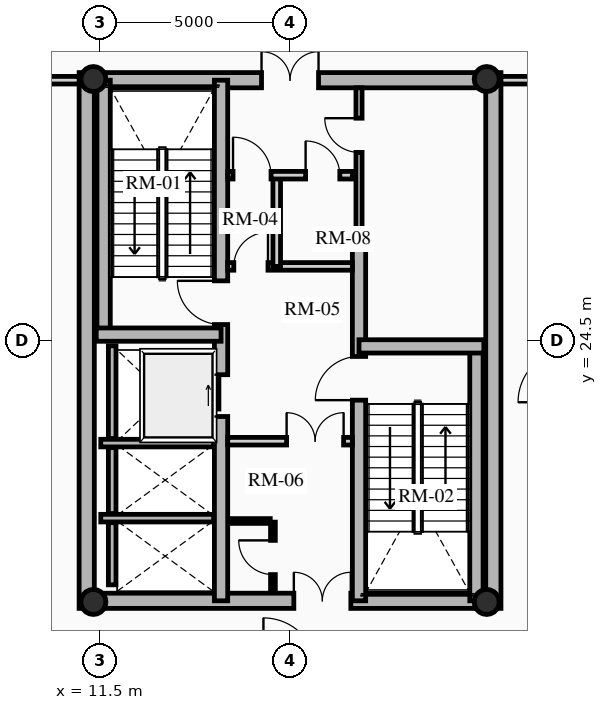
"""IFC4 building model, lengths in metres.
Left out: names, types, materials, properties, quantities, classifications, styles, units other than length and angle.
Written with IfcOpenShell. Run it as: python <this file> out.ifc"""

import sys

from ifc_helpers import new_model, si_unit, direction, frame, frame_2d, origin, origin_2d, place, context, subcontext, project, spatial, rectangle, hollow_circle, extrude, source, transform, mapped, element, fill, save


model = new_model("IFC4")
c1 = context("Model", 3, precision=1e-05, world=origin(), true_north=direction((0.0, 1.0)))
c2 = subcontext(c1, "Body", "Model", "MODEL_VIEW")
j1 = project(units=[si_unit("LENGTHUNIT", "METRE"), si_unit("PLANEANGLEUNIT", "RADIAN")], contexts=[c1])
p1 = place(None, origin())
s1 = spatial("IfcSite", under=j1, at=p1, CompositionType="ELEMENT")
p2 = place(p1, origin())
s2 = spatial("IfcBuilding", under=s1, at=p2, CompositionType="ELEMENT")
p3 = place(p2, frame((0.0, 0.0, 235.65)))
s3 = spatial("IfcBuildingStorey", under=s2, at=p3, CompositionType="ELEMENT", Elevation=235.65)
for number, where, z_axis, x_axis in (
    (1, (11.15, 17.45, 0.0), (0.0, 0.0, 1.0), (0.0, 1.0, 0.0)),
    (2, (21.85, 17.45, 0.0), (0.0, 0.0, 1.0), (0.0, 1.0, 0.0)),
):
    element("IfcWall", number, at=place(p3, frame(where, z_axis=z_axis, x_axis=x_axis)), inside=s3, PredefinedType="SHEAR", context=c2, shape_type="SweptSolid", body=[
        extrude(rectangle(XDim=14.1, YDim=0.4, at=frame_2d((7.05, 0.0))), origin(), (0.0, 0.0, 1.0), 4.68),
    ])
p4 = place(p3, frame((11.15, 17.65, 0.0), z_axis=(0.0, 0.0, 1.0), x_axis=(1.0, 0.0, 0.0)))
e3 = element("IfcWall", 3, at=p4, inside=s3, PredefinedType="SHEAR", context=c2, shape_type="SweptSolid", body=[
    extrude(rectangle(XDim=10.7, YDim=0.4, at=frame_2d((5.35, 0.0))), origin(), (0.0, 0.0, 1.0), 4.68),
])
m1 = source(origin(), c2, "Body", "SweptSolid", [
    extrude(rectangle(XDim=1.5, YDim=2.02, at=frame_2d((0.75, 1.01))), frame((0.0, 0.21, 0.0), z_axis=(0.0, -1.0, 0.0), x_axis=(1.0, 0.0, 0.0)), (0.0, 0.0, 1.0), 0.42),
])
p5 = place(p4, frame((5.45, 0.0, 0.0)))
e4 = element("IfcOpeningElement", 4, at=p5, cuts=e3, PredefinedType="OPENING", context=c2, shape_type="MappedRepresentation", body=[
    mapped(m1, transform((0.0, 0.0, 0.0), x_axis=(1.0, 0.0, 0.0), y_axis=(0.0, 1.0, 0.0), z_axis=(0.0, 0.0, 1.0), scale=1.0)),
])
p6 = place(p3, frame((11.15, 31.35, 0.0), z_axis=(0.0, 0.0, 1.0), x_axis=(1.0, 0.0, 0.0)))
e5 = element("IfcWall", 5, at=p6, inside=s3, PredefinedType="SHEAR", context=c2, shape_type="SweptSolid", body=[
    extrude(rectangle(XDim=10.7, YDim=0.4, at=frame_2d((5.35, 0.0))), origin(), (0.0, 0.0, 1.0), 4.68),
])
p7 = place(p6, frame((4.6, 0.0, 0.0)))
e6 = element("IfcOpeningElement", 6, at=p7, cuts=e5, PredefinedType="OPENING", context=c2, shape_type="MappedRepresentation", body=[
    mapped(m1, transform((0.0, 0.0, 0.0), x_axis=(1.0, 0.0, 0.0), y_axis=(0.0, 1.0, 0.0), z_axis=(0.0, 0.0, 1.0), scale=1.0)),
])
p8 = place(p3, frame((14.685, 17.65, 0.0), z_axis=(0.0, 0.0, 1.0), x_axis=(0.0, 1.0, 0.0)))
e7 = element("IfcWall", 7, at=p8, inside=s3, PredefinedType="SHEAR", context=c2, shape_type="SweptSolid", body=[
    extrude(rectangle(XDim=13.7, YDim=0.35, at=frame_2d((6.85, 0.0))), origin(), (0.0, 0.0, 1.0), 4.68),
])
m2 = source(origin(), c2, "Body", "SweptSolid", [
    extrude(rectangle(XDim=1.1, YDim=2.015, at=frame_2d((0.55, 1.007))), frame((0.0, 0.185, 0.0), z_axis=(0.0, -1.0, 0.0), x_axis=(1.0, 0.0, 0.0)), (0.0, 0.0, 1.0), 0.37),
])
p9 = place(p8, frame((4.85, 0.0, 0.0)))
e8 = element("IfcOpeningElement", 8, at=p9, cuts=e7, PredefinedType="OPENING", context=c2, shape_type="MappedRepresentation", body=[
    mapped(m2, transform((0.0, 0.0, 0.0), x_axis=(1.0, 0.0, 0.0), y_axis=(0.0, 1.0, 0.0), z_axis=(0.0, 0.0, 1.0), scale=1.0)),
])
m3 = source(origin(), c2, "Body", "SweptSolid", [
    extrude(rectangle(XDim=1.15, YDim=2.02, at=frame_2d((0.575, 1.01))), frame((0.0, 0.185, 0.0), z_axis=(0.0, -1.0, 0.0), x_axis=(1.0, 0.0, 0.0)), (0.0, 0.0, 1.0), 0.37),
])
p10 = place(p8, frame((7.27, 0.0, 0.0)))
e9 = element("IfcOpeningElement", 9, at=p10, cuts=e7, PredefinedType="OPENING", context=c2, shape_type="MappedRepresentation", body=[
    mapped(m3, transform((0.0, 0.0, 0.0), x_axis=(1.0, 0.0, 0.0), y_axis=(0.0, 1.0, 0.0), z_axis=(0.0, 0.0, 1.0), scale=1.0)),
])
p11 = place(p3, frame((18.315, 17.65, 0.0), z_axis=(0.0, 0.0, 1.0), x_axis=(0.0, 1.0, 0.0)))
e10 = element("IfcWall", 10, at=p11, inside=s3, PredefinedType="SHEAR", context=c2, shape_type="SweptSolid", body=[
    extrude(rectangle(XDim=9.6, YDim=0.35, at=frame_2d((4.8, 0.0))), origin(), (0.0, 0.0, 1.0), 4.68),
])
p12 = place(p11, frame((5.28, 0.0, 0.0)))
e11 = element("IfcOpeningElement", 11, at=p12, cuts=e10, PredefinedType="OPENING", context=c2, shape_type="MappedRepresentation", body=[
    mapped(m3, transform((0.0, 0.0, 0.0), x_axis=(1.0, 0.0, 0.0), y_axis=(0.0, 1.0, 0.0), z_axis=(0.0, 0.0, 1.0), scale=1.0)),
])
p13 = place(p3, frame((11.595, 24.655, 0.0), z_axis=(0.0, 0.0, 1.0), x_axis=(0.0, 1.0, 0.0)))
e12 = element("IfcWall", 12, at=p13, inside=s3, PredefinedType="SHEAR", context=c2, shape_type="SweptSolid", body=[
    extrude(rectangle(XDim=6.695, YDim=0.35, at=frame_2d((3.348, 0.0))), origin(), (0.0, 0.0, 1.0), 4.68),
])
p14 = place(p3, frame((11.4, 24.655, 0.0), z_axis=(0.0, 0.0, 1.0), x_axis=(1.0, 0.0, 0.0)))
e13 = element("IfcWall", 13, at=p14, inside=s3, PredefinedType="SHEAR", context=c2, shape_type="SweptSolid", body=[
    extrude(rectangle(XDim=3.285, YDim=0.35, at=frame_2d((1.643, 0.0))), origin(), (0.0, 0.0, 1.0), 4.68),
])
p15 = place(p3, frame((21.405, 17.65, 0.0), z_axis=(0.0, 0.0, 1.0), x_axis=(0.0, 1.0, 0.0)))
e14 = element("IfcWall", 14, at=p15, inside=s3, PredefinedType="SHEAR", context=c2, shape_type="SweptSolid", body=[
    extrude(rectangle(XDim=6.695, YDim=0.35, at=frame_2d((3.348, 0.0))), origin(), (0.0, 0.0, 1.0), 4.68),
])
p16 = place(p3, frame((18.315, 24.345, 0.0), z_axis=(0.0, 0.0, 1.0), x_axis=(1.0, 0.0, 0.0)))
e15 = element("IfcWall", 15, at=p16, inside=s3, PredefinedType="SHEAR", context=c2, shape_type="SweptSolid", body=[
    extrude(rectangle(XDim=3.285, YDim=0.35, at=frame_2d((1.643, 0.0))), origin(), (0.0, 0.0, 1.0), 4.68),
])
for number, where, z_axis, x_axis in (
    (16, (11.325, 17.62, 0.0), (0.0, 0.0, 1.0), (1.0, 0.0, 0.0)),
    (17, (11.325, 31.38, 0.0), (0.0, 0.0, 1.0), (1.0, 0.0, 0.0)),
    (18, (21.675, 17.62, 0.0), (0.0, 0.0, 1.0), (1.0, 0.0, 0.0)),
    (19, (21.675, 31.38, 0.0), (0.0, 0.0, 1.0), (1.0, 0.0, 0.0)),
):
    element("IfcColumn", number, at=place(p3, frame(where, z_axis=z_axis, x_axis=x_axis)), inside=s3, PredefinedType="COLUMN", context=c2, shape_type="SweptSolid", body=[
        extrude(hollow_circle(Radius=0.33, WallThickness=0.025, at=origin_2d()), origin(), (0.0, 0.0, 1.0), 4.68),
    ])
p17 = place(p3, frame((11.52, 21.8, 0.0), z_axis=(0.0, 0.0, 1.0), x_axis=(1.0, 0.0, 0.0)))
e20 = element("IfcWall", 20, at=p17, inside=s3, PredefinedType="SHEAR", context=c2, shape_type="SweptSolid", body=[
    extrude(rectangle(XDim=2.97, YDim=0.2, at=frame_2d((1.485, 0.0))), origin(), (0.0, 0.0, 1.0), 4.68),
])
p18 = place(p3, frame((11.82, 21.92, 0.0), z_axis=(0.0, 0.0, 1.0), x_axis=(0.0, 1.0, 0.0)))
e21 = element("IfcWall", 21, at=p18, inside=s3, PredefinedType="SHEAR", context=c2, shape_type="SweptSolid", body=[
    extrude(rectangle(XDim=2.44, YDim=0.2, at=frame_2d((1.22, 0.0))), origin(), (0.0, 0.0, 1.0), 4.68),
])
p19 = place(p3, frame((11.52, 19.825, 0.0), z_axis=(0.0, 0.0, 1.0), x_axis=(1.0, 0.0, 0.0)))
e22 = element("IfcWall", 22, at=p19, inside=s3, PredefinedType="SHEAR", context=c2, shape_type="SweptSolid", body=[
    extrude(rectangle(XDim=2.97, YDim=0.2, at=frame_2d((1.485, 0.0))), origin(), (0.0, 0.0, 1.0), 4.68),
])
p20 = place(p3, frame((11.82, 19.945, 0.0), z_axis=(0.0, 0.0, 1.0), x_axis=(0.0, 1.0, 0.0)))
e23 = element("IfcWall", 23, at=p20, inside=s3, PredefinedType="SHEAR", context=c2, shape_type="SweptSolid", body=[
    extrude(rectangle(XDim=1.735, YDim=0.2, at=frame_2d((0.867, 0.0))), origin(), (0.0, 0.0, 1.0), 4.68),
])
p21 = place(p3, frame((11.82, 18.07, 0.0), z_axis=(0.0, 0.0, 1.0), x_axis=(0.0, 1.0, 0.0)))
e24 = element("IfcWall", 24, at=p21, inside=s3, PredefinedType="SHEAR", context=c2, shape_type="SweptSolid", body=[
    extrude(rectangle(XDim=1.635, YDim=0.2, at=frame_2d((0.817, 0.0))), origin(), (0.0, 0.0, 1.0), 4.68),
])
p22 = place(p3, frame((14.86, 21.85, 0.0), z_axis=(0.0, 0.0, 1.0), x_axis=(1.0, 0.0, 0.0)))
e25 = element("IfcWall", 25, at=p22, inside=s3, PredefinedType="PARTITIONING", context=c2, shape_type="SweptSolid", body=[
    extrude(rectangle(XDim=3.28, YDim=0.2, at=frame_2d((1.64, 0.0))), origin(), (0.0, 0.0, 1.0), 4.325),
])
m4 = source(origin(), c2, "Body", "SweptSolid", [
    extrude(rectangle(XDim=1.5, YDim=2.02, at=frame_2d((0.75, 1.01))), frame((0.0, 0.11, 0.0), z_axis=(0.0, -1.0, 0.0), x_axis=(1.0, 0.0, 0.0)), (0.0, 0.0, 1.0), 0.22),
])
p23 = place(p22, frame((1.55, 0.0, 0.0)))
e26 = element("IfcOpeningElement", 26, at=p23, cuts=e25, PredefinedType="OPENING", context=c2, shape_type="MappedRepresentation", body=[
    mapped(m4, transform((0.0, 0.0, 0.0), x_axis=(1.0, 0.0, 0.0), y_axis=(0.0, 1.0, 0.0), z_axis=(0.0, 0.0, 1.0), scale=1.0)),
])
p24 = place(p3, frame((14.86, 26.45, 0.0), z_axis=(0.0, 0.0, 1.0), x_axis=(1.0, 0.0, 0.0)))
e27 = element("IfcWall", 27, at=p24, inside=s3, PredefinedType="PARTITIONING", context=c2, shape_type="SweptSolid", body=[
    extrude(rectangle(XDim=3.28, YDim=0.2, at=frame_2d((1.64, 0.0))), origin(), (0.0, 0.0, 1.0), 4.325),
])
m5 = source(origin(), c2, "Body", "SweptSolid", [
    extrude(rectangle(XDim=0.9, YDim=2.005, at=frame_2d((0.45, 1.002))), frame((0.0, 0.11, 0.0), z_axis=(0.0, -1.0, 0.0), x_axis=(1.0, 0.0, 0.0)), (0.0, 0.0, 1.0), 0.22),
])
p25 = place(p24, frame((0.16, 0.0, 0.0)))
e28 = element("IfcOpeningElement", 28, at=p25, cuts=e27, PredefinedType="OPENING", context=c2, shape_type="MappedRepresentation", body=[
    mapped(m5, transform((0.0, 0.0, 0.0), x_axis=(1.0, 0.0, 0.0), y_axis=(0.0, 1.0, 0.0), z_axis=(0.0, 0.0, 1.0), scale=1.0)),
])
p26 = place(p3, frame((16.15, 26.45, 0.0), z_axis=(0.0, 0.0, 1.0), x_axis=(0.0, 1.0, 0.0)))
e29 = element("IfcWall", 29, at=p26, inside=s3, PredefinedType="PARTITIONING", context=c2, shape_type="SweptSolid", body=[
    extrude(rectangle(XDim=2.4, YDim=0.2, at=frame_2d((1.2, 0.0))), origin(), (0.0, 0.0, 1.0), 4.325),
])
p27 = place(p3, frame((14.86, 28.85, 0.0), z_axis=(0.0, 0.0, 1.0), x_axis=(1.0, 0.0, 0.0)))
e30 = element("IfcWall", 30, at=p27, inside=s3, PredefinedType="PARTITIONING", context=c2, shape_type="SweptSolid", body=[
    extrude(rectangle(XDim=3.28, YDim=0.2, at=frame_2d((1.64, 0.0))), origin(), (0.0, 0.0, 1.0), 4.325),
])
m6 = source(origin(), c2, "Body", "SweptSolid", [
    extrude(rectangle(XDim=1.0, YDim=2.015, at=frame_2d((0.5, 1.007))), frame((0.0, 0.11, 0.0), z_axis=(0.0, -1.0, 0.0), x_axis=(1.0, 0.0, 0.0)), (0.0, 0.0, 1.0), 0.22),
])
p28 = place(p27, frame((0.14, 0.0, 0.0)))
e31 = element("IfcOpeningElement", 31, at=p28, cuts=e30, PredefinedType="OPENING", context=c2, shape_type="MappedRepresentation", body=[
    mapped(m6, transform((0.0, 0.0, 0.0), x_axis=(1.0, 0.0, 0.0), y_axis=(0.0, 1.0, 0.0), z_axis=(0.0, 0.0, 1.0), scale=1.0)),
])
p29 = place(p27, frame((2.05, 0.0, 0.0)))
e32 = element("IfcOpeningElement", 32, at=p29, cuts=e30, PredefinedType="OPENING", context=c2, shape_type="MappedRepresentation", body=[
    mapped(m5, transform((0.0, 0.0, 0.0), x_axis=(1.0, 0.0, 0.0), y_axis=(0.0, 1.0, 0.0), z_axis=(0.0, 0.0, 1.0), scale=1.0)),
])
p30 = place(p3, frame((16.05, 17.92, 0.0), z_axis=(0.0, 0.0, 1.0), x_axis=(0.0, 1.0, 0.0)))
e33 = element("IfcWall", 33, at=p30, inside=s3, PredefinedType="PARTITIONING", context=c2, shape_type="SweptSolid", body=[
    extrude(rectangle(XDim=1.8, YDim=0.125, at=frame_2d((0.9, 0.0))), origin(), (0.0, 0.0, 1.0), 4.325),
])
m7 = source(origin(), c2, "Body", "SweptSolid", [
    extrude(rectangle(XDim=0.9, YDim=2.005, at=frame_2d((0.45, 1.002))), frame((0.0, 0.073, 0.0), z_axis=(0.0, -1.0, 0.0), x_axis=(1.0, 0.0, 0.0)), (0.0, 0.0, 1.0), 0.145),
])
p31 = place(p30, frame((0.42, 0.0, 0.0)))
e34 = element("IfcOpeningElement", 34, at=p31, cuts=e33, PredefinedType="OPENING", context=c2, shape_type="MappedRepresentation", body=[
    mapped(m7, transform((0.0, 0.0, 0.0), x_axis=(1.0, 0.0, 0.0), y_axis=(0.0, 1.0, 0.0), z_axis=(0.0, 0.0, 1.0), scale=1.0)),
])
p32 = place(p3, frame((14.88, 19.75, 0.0), z_axis=(0.0, 0.0, 1.0), x_axis=(1.0, 0.0, 0.0)))
e35 = element("IfcWall", 35, at=p32, inside=s3, PredefinedType="PARTITIONING", context=c2, shape_type="SweptSolid", body=[
    extrude(rectangle(XDim=1.1, YDim=0.125, at=frame_2d((0.55, 0.0))), origin(), (0.0, 0.0, 1.0), 4.325),
])
p33 = place(p3, frame((18.315, 27.25, 0.0), z_axis=(0.0, 0.0, 1.0), x_axis=(0.0, 1.0, 0.0)))
e36 = element("IfcWall", 36, at=p33, inside=s3, PredefinedType="PARTITIONING", context=c2, shape_type="SweptSolid", body=[
    extrude(rectangle(XDim=3.9, YDim=0.16, at=frame_2d((1.95, 0.0))), origin(), (0.0, 0.0, 1.0), 4.325),
])
m8 = source(origin(), c2, "Body", "SweptSolid", [
    extrude(rectangle(XDim=0.9, YDim=2.005, at=frame_2d((0.45, 1.002))), frame((0.0, 0.09, 0.0), z_axis=(0.0, -1.0, 0.0), x_axis=(1.0, 0.0, 0.0)), (0.0, 0.0, 1.0), 0.18),
])
p34 = place(p33, frame((2.2, 0.0, 0.0)))
e37 = element("IfcOpeningElement", 37, at=p34, cuts=e36, PredefinedType="OPENING", context=c2, shape_type="MappedRepresentation", body=[
    mapped(m8, transform((0.0, 0.0, 0.0), x_axis=(1.0, 0.0, 0.0), y_axis=(0.0, 1.0, 0.0), z_axis=(0.0, 0.0, 1.0), scale=1.0)),
])
p35 = place(p3, frame((9.1, 31.35, 0.0), z_axis=(0.0, 0.0, 1.0), x_axis=(1.0, 0.0, 0.0)))
e38 = element("IfcWall", 38, at=p35, inside=s3, PredefinedType="PARTITIONING", context=c2, shape_type="SweptSolid", body=[
    extrude(rectangle(XDim=1.85, YDim=0.2, at=frame_2d((0.925, 0.0))), origin(), (0.0, 0.0, 1.0), 3.616),
])
p36 = place(p3, frame((22.05, 31.35, 0.0), z_axis=(0.0, 0.0, 1.0), x_axis=(1.0, 0.0, 0.0)))
e39 = element("IfcWall", 39, at=p36, inside=s3, PredefinedType="PARTITIONING", context=c2, shape_type="SweptSolid", body=[
    extrude(rectangle(XDim=1.85, YDim=0.2, at=frame_2d((0.925, 0.0))), origin(), (0.0, 0.0, 1.0), 2.892),
])
m9 = source(origin(), c2, "Body", "SweptSolid", [
    extrude(rectangle(XDim=1.1, YDim=2.015, at=frame_2d((0.55, 1.007))), frame((0.0, 0.025, 0.0), z_axis=(0.0, -1.0, 0.0), x_axis=(1.0, 0.0, 0.0)), (0.0, 0.0, 1.0), 0.05),
])
p37 = place(p9, origin())
e40 = element("IfcDoor", 40, at=p37, inside=s3, OperationType="SLIDING_TO_RIGHT", PredefinedType="DOOR", context=c2, shape_type="MappedRepresentation", body=[
    mapped(m9, transform((0.0, 0.0, 0.0), x_axis=(1.0, 0.0, 0.0), y_axis=(0.0, 1.0, 0.0), z_axis=(0.0, 0.0, 1.0), scale=1.0)),
])
fill(e8, e40)
m10 = source(origin(), c2, "Body", "SweptSolid", [
    extrude(rectangle(XDim=1.15, YDim=2.02, at=frame_2d((0.575, 1.01))), frame((0.0, 0.025, 0.0), z_axis=(0.0, -1.0, 0.0), x_axis=(1.0, 0.0, 0.0)), (0.0, 0.0, 1.0), 0.05),
])
p38 = place(p10, origin())
e41 = element("IfcDoor", 41, at=p38, inside=s3, OperationType="SINGLE_SWING_RIGHT", PredefinedType="DOOR", context=c2, shape_type="MappedRepresentation", body=[
    mapped(m10, transform((0.0, 0.0, 0.0), x_axis=(1.0, 0.0, 0.0), y_axis=(0.0, 1.0, 0.0), z_axis=(0.0, 0.0, 1.0), scale=1.0)),
])
fill(e9, e41)
p39 = place(p12, origin())
e42 = element("IfcDoor", 42, at=p39, inside=s3, OperationType="SINGLE_SWING_LEFT", PredefinedType="DOOR", context=c2, shape_type="MappedRepresentation", body=[
    mapped(m10, transform((0.0, 0.0, 0.0), x_axis=(1.0, 0.0, 0.0), y_axis=(0.0, 1.0, 0.0), z_axis=(0.0, 0.0, 1.0), scale=1.0)),
])
fill(e11, e42)
m11 = source(origin(), c2, "Body", "SweptSolid", [
    extrude(rectangle(XDim=1.5, YDim=2.02, at=frame_2d((0.75, 1.01))), frame((0.0, 0.025, 0.0), z_axis=(0.0, -1.0, 0.0), x_axis=(1.0, 0.0, 0.0)), (0.0, 0.0, 1.0), 0.05),
])
p40 = place(p7, origin())
e43 = element("IfcDoor", 43, at=p40, inside=s3, OperationType="DOUBLE_DOOR_SINGLE_SWING", PredefinedType="DOOR", context=c2, shape_type="MappedRepresentation", body=[
    mapped(m11, transform((0.0, 0.0, 0.0), x_axis=(1.0, 0.0, 0.0), y_axis=(0.0, 1.0, 0.0), z_axis=(0.0, 0.0, 1.0), scale=1.0)),
])
fill(e6, e43)
p41 = place(p5, origin())
e44 = element("IfcDoor", 44, at=p41, inside=s3, OperationType="DOUBLE_DOOR_SINGLE_SWING", PredefinedType="DOOR", context=c2, shape_type="MappedRepresentation", body=[
    mapped(m11, transform((0.0, 0.0, 0.0), x_axis=(1.0, 0.0, 0.0), y_axis=(0.0, 1.0, 0.0), z_axis=(0.0, 0.0, 1.0), scale=1.0)),
])
fill(e4, e44)
p42 = place(p23, origin())
e45 = element("IfcDoor", 45, at=p42, inside=s3, OperationType="DOUBLE_DOOR_SINGLE_SWING", PredefinedType="DOOR", context=c2, shape_type="MappedRepresentation", body=[
    mapped(m11, transform((0.0, 0.0, 0.0), x_axis=(1.0, 0.0, 0.0), y_axis=(0.0, 1.0, 0.0), z_axis=(0.0, 0.0, 1.0), scale=1.0)),
])
fill(e26, e45)
m12 = source(origin(), c2, "Body", "SweptSolid", [
    extrude(rectangle(XDim=0.9, YDim=2.005, at=frame_2d((0.45, 1.002))), frame((0.0, 0.025, 0.0), z_axis=(0.0, -1.0, 0.0), x_axis=(1.0, 0.0, 0.0)), (0.0, 0.0, 1.0), 0.05),
])
p43 = place(p25, origin())
e46 = element("IfcDoor", 46, at=p43, inside=s3, OperationType="SINGLE_SWING_RIGHT", PredefinedType="DOOR", context=c2, shape_type="MappedRepresentation", body=[
    mapped(m12, transform((0.0, 0.0, 0.0), x_axis=(1.0, 0.0, 0.0), y_axis=(0.0, 1.0, 0.0), z_axis=(0.0, 0.0, 1.0), scale=1.0)),
])
fill(e28, e46)
m13 = source(origin(), c2, "Body", "SweptSolid", [
    extrude(rectangle(XDim=1.0, YDim=2.015, at=frame_2d((0.5, 1.007))), frame((0.0, 0.025, 0.0), z_axis=(0.0, -1.0, 0.0), x_axis=(1.0, 0.0, 0.0)), (0.0, 0.0, 1.0), 0.05),
])
p44 = place(p28, origin())
e47 = element("IfcDoor", 47, at=p44, inside=s3, OperationType="SINGLE_SWING_LEFT", PredefinedType="DOOR", context=c2, shape_type="MappedRepresentation", body=[
    mapped(m13, transform((0.0, 0.0, 0.0), x_axis=(1.0, 0.0, 0.0), y_axis=(0.0, 1.0, 0.0), z_axis=(0.0, 0.0, 1.0), scale=1.0)),
])
fill(e31, e47)
p45 = place(p31, origin())
e48 = element("IfcDoor", 48, at=p45, inside=s3, OperationType="SINGLE_SWING_RIGHT", PredefinedType="DOOR", context=c2, shape_type="MappedRepresentation", body=[
    mapped(m12, transform((0.0, 0.0, 0.0), x_axis=(1.0, 0.0, 0.0), y_axis=(0.0, 1.0, 0.0), z_axis=(0.0, 0.0, 1.0), scale=1.0)),
])
fill(e34, e48)
p46 = place(p29, origin())
e49 = element("IfcDoor", 49, at=p46, inside=s3, OperationType="SINGLE_SWING_LEFT", PredefinedType="DOOR", context=c2, shape_type="MappedRepresentation", body=[
    mapped(m12, transform((0.0, 0.0, 0.0), x_axis=(1.0, 0.0, 0.0), y_axis=(0.0, 1.0, 0.0), z_axis=(0.0, 0.0, 1.0), scale=1.0)),
])
fill(e32, e49)
p47 = place(p34, origin())
e50 = element("IfcDoor", 50, at=p47, inside=s3, OperationType="SINGLE_SWING_RIGHT", PredefinedType="DOOR", context=c2, shape_type="MappedRepresentation", body=[
    mapped(m12, transform((0.0, 0.0, 0.0), x_axis=(1.0, 0.0, 0.0), y_axis=(0.0, 1.0, 0.0), z_axis=(0.0, 0.0, 1.0), scale=1.0)),
])
fill(e37, e50)
save(model, sys.argv[1])
